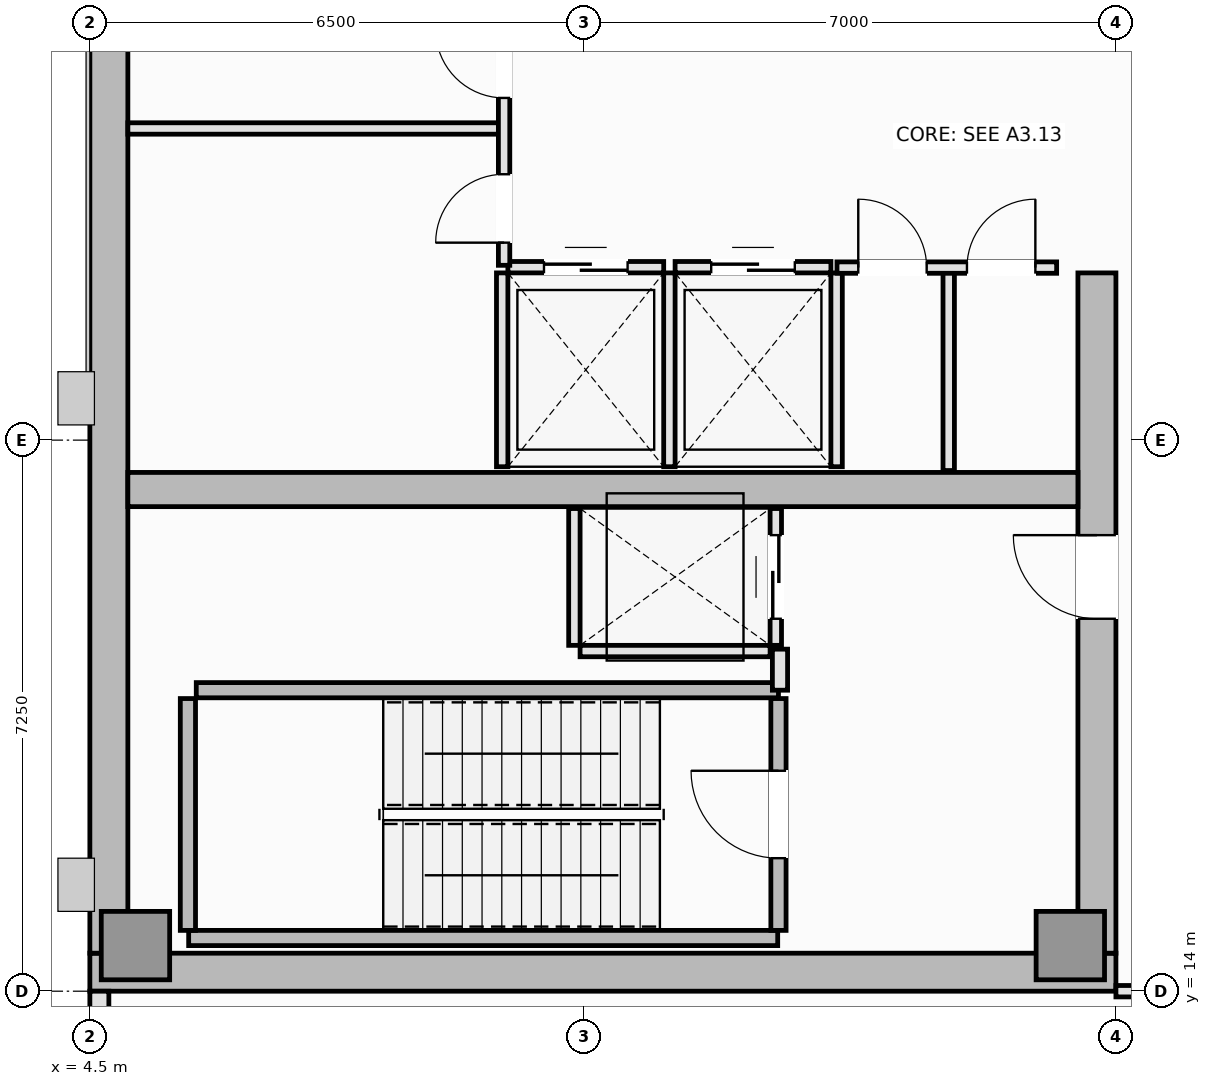
"""IFC4 building model, lengths in metres.
Left out: names, types, materials, properties, quantities, classifications, styles, units other than length and angle.
Written with IfcOpenShell. Run it as: python <this file> out.ifc"""

import sys

from ifc_helpers import new_model, si_unit, direction, frame, frame_2d, origin, origin_2d, place, context, subcontext, project, spatial, rectangle, extrude, element, fill, save


model = new_model("IFC4")
c1 = context("Model", 3, precision=1e-05, world=origin(), true_north=direction((0.0, 1.0)))
c2 = subcontext(c1, "Body", "Model", "MODEL_VIEW")
j1 = project(units=[si_unit("LENGTHUNIT", "METRE"), si_unit("PLANEANGLEUNIT", "RADIAN")], contexts=[c1])
p1 = place(None, origin())
s1 = spatial("IfcSite", under=j1, at=p1, CompositionType="ELEMENT")
p2 = place(p1, origin())
s2 = spatial("IfcBuilding", under=s1, at=p2, CompositionType="ELEMENT")
p3 = place(p2, frame((0.0, 0.0, 291.85)))
s3 = spatial("IfcBuildingStorey", under=s2, at=p3, CompositionType="ELEMENT", Elevation=291.85)
p4 = place(p3, frame((4.5, 14.25, 0.0), z_axis=(0.0, 0.0, 1.0), x_axis=(1.0, 0.0, 0.0)))
e1 = element("IfcWall", 1, at=p4, inside=s3, PredefinedType="SHEAR", context=c2, shape_type="SweptSolid", body=[
    extrude(rectangle(XDim=13.5, YDim=0.5, at=frame_2d((6.75, 0.0))), origin(), (0.0, 0.0, 1.0), 4.8),
])
p5 = place(p3, frame((4.75, 14.5, 0.0), z_axis=(0.0, 0.0, 1.0), x_axis=(0.0, 1.0, 0.0)))
e2 = element("IfcWall", 2, at=p5, inside=s3, PredefinedType="SHEAR", context=c2, shape_type="SweptSolid", body=[
    extrude(rectangle(XDim=21.5, YDim=0.5, at=frame_2d((10.75, 0.0))), origin(), (0.0, 0.0, 1.0), 4.8),
])
p6 = place(p3, frame((17.75, 14.5, 0.0), z_axis=(0.0, 0.0, 1.0), x_axis=(0.0, 1.0, 0.0)))
e3 = element("IfcWall", 3, at=p6, inside=s3, PredefinedType="SHEAR", context=c2, shape_type="SweptSolid", body=[
    extrude(rectangle(XDim=8.95, YDim=0.5, at=frame_2d((4.475, 0.0))), origin(), (0.0, 0.0, 1.0), 4.8),
])
p7 = place(p6, frame((4.4, 0.0, 0.0)))
e4 = element("IfcOpeningElement", 4, at=p7, cuts=e3, PredefinedType="OPENING", context=c2, shape_type="SweptSolid", body=[
    extrude(rectangle(XDim=1.1, YDim=2.15, at=frame_2d((0.55, 1.075))), frame((0.0, 0.26, 0.0), z_axis=(0.0, -1.0, 0.0), x_axis=(1.0, 0.0, 0.0)), (0.0, 0.0, 1.0), 0.52),
])
p8 = place(p3, frame((5.0, 20.6, 0.0), z_axis=(0.0, 0.0, 1.0), x_axis=(1.0, 0.0, 0.0)))
e5 = element("IfcWall", 5, at=p8, inside=s3, PredefinedType="SHEAR", context=c2, shape_type="SweptSolid", body=[
    extrude(rectangle(XDim=12.5, YDim=0.45, at=frame_2d((6.25, 0.0))), origin(), (0.0, 0.0, 1.0), 4.8),
])
for number, where, z_axis, x_axis in (
    (6, (5.1, 14.6, 0.0), (0.0, 0.0, 1.0), (1.0, 0.0, 0.0)),
    (7, (17.4, 14.6, 0.0), (0.0, 0.0, 1.0), (1.0, 0.0, 0.0)),
):
    element("IfcColumn", number, at=place(p3, frame(where, z_axis=z_axis, x_axis=x_axis)), inside=s3, PredefinedType="PILASTER", context=c2, shape_type="SweptSolid", body=[
        extrude(rectangle(XDim=0.9, YDim=0.9, at=origin_2d()), origin(), (0.0, 0.0, 1.0), 4.8),
    ])
p9 = place(p3, frame((4.625, 14.0, 0.0), z_axis=(0.0, 0.0, 1.0), x_axis=(0.0, -1.0, 0.0)))
e8 = element("IfcWall", 8, at=p9, inside=s3, PredefinedType="SOLIDWALL", context=c2, shape_type="SweptSolid", body=[
    extrude(rectangle(XDim=3.4, YDim=0.25, at=frame_2d((1.7, 0.0))), origin(), (0.0, 0.0, 1.0), 4.6),
])
p10 = place(p9, frame((0.6, 0.0, 0.9)))
e9 = element("IfcOpeningElement", 9, at=p10, cuts=e8, PredefinedType="OPENING", context=c2, shape_type="SweptSolid", body=[
    extrude(rectangle(XDim=2.2, YDim=1.8, at=frame_2d((1.1, 0.9))), frame((0.0, 0.135, 0.0), z_axis=(0.0, -1.0, 0.0), x_axis=(1.0, 0.0, 0.0)), (0.0, 0.0, 1.0), 0.27),
])
p11 = place(p3, frame((5.8, 14.7, 0.0), z_axis=(0.0, 0.0, 1.0), x_axis=(1.0, 0.0, 0.0)))
e10 = element("IfcWall", 10, at=p11, inside=s3, PredefinedType="SOLIDWALL", context=c2, shape_type="SweptSolid", body=[
    extrude(rectangle(XDim=7.75, YDim=0.2, at=frame_2d((3.875, 0.0))), origin(), (0.0, 0.0, 1.0), 4.8),
])
p12 = place(p3, frame((5.79, 14.8, 0.0), z_axis=(0.0, 0.0, 1.0), x_axis=(0.0, 1.0, 0.0)))
e11 = element("IfcWall", 11, at=p12, inside=s3, PredefinedType="SOLIDWALL", context=c2, shape_type="SweptSolid", body=[
    extrude(rectangle(XDim=3.05, YDim=0.2, at=frame_2d((1.525, 0.0))), origin(), (0.0, 0.0, 1.0), 4.8),
])
p13 = place(p3, frame((5.9, 17.96, 0.0), z_axis=(0.0, 0.0, 1.0), x_axis=(1.0, 0.0, 0.0)))
e12 = element("IfcWall", 12, at=p13, inside=s3, PredefinedType="SOLIDWALL", context=c2, shape_type="SweptSolid", body=[
    extrude(rectangle(XDim=7.66, YDim=0.2, at=frame_2d((3.83, 0.0))), origin(), (0.0, 0.0, 1.0), 4.8),
])
p14 = place(p3, frame((13.56, 14.8, 0.0), z_axis=(0.0, 0.0, 1.0), x_axis=(0.0, 1.0, 0.0)))
e13 = element("IfcWall", 13, at=p14, inside=s3, PredefinedType="SOLIDWALL", context=c2, shape_type="SweptSolid", body=[
    extrude(rectangle(XDim=3.05, YDim=0.2, at=frame_2d((1.525, 0.0))), origin(), (0.0, 0.0, 1.0), 4.8),
])
p15 = place(p14, frame((0.95, 0.0, 0.0)))
e14 = element("IfcOpeningElement", 14, at=p15, cuts=e13, PredefinedType="OPENING", context=c2, shape_type="SweptSolid", body=[
    extrude(rectangle(XDim=1.15, YDim=2.15, at=frame_2d((0.575, 1.075))), frame((0.0, 0.11, 0.0), z_axis=(0.0, -1.0, 0.0), x_axis=(1.0, 0.0, 0.0)), (0.0, 0.0, 1.0), 0.22),
])
p16 = place(p3, frame((10.0, 23.525, 0.0), z_axis=(0.0, 0.0, 1.0), x_axis=(1.0, 0.0, 0.0)))
e15 = element("IfcWall", 15, at=p16, inside=s3, PredefinedType="PARTITIONING", context=c2, shape_type="SweptSolid", body=[
    extrude(rectangle(XDim=2.05, YDim=0.15, at=frame_2d((1.025, 0.0))), origin(), (0.0, 0.0, 1.0), 4.6),
])
p17 = place(p16, frame((0.475, 0.0, 0.0)))
e16 = element("IfcOpeningElement", 16, at=p17, cuts=e15, PredefinedType="OPENING", context=c2, shape_type="SweptSolid", body=[
    extrude(rectangle(XDim=1.1, YDim=2.2, at=frame_2d((0.55, 1.1))), frame((0.0, 0.085, 0.0), z_axis=(0.0, -1.0, 0.0), x_axis=(1.0, 0.0, 0.0)), (0.0, 0.0, 1.0), 0.17),
])
for number, where, z_axis, x_axis in (
    (17, (9.925, 20.9, 0.0), (0.0, 0.0, 1.0), (0.0, 1.0, 0.0)),
    (18, (12.125, 20.9, 0.0), (0.0, 0.0, 1.0), (0.0, 1.0, 0.0)),
):
    element("IfcWall", number, at=place(p3, frame(where, z_axis=z_axis, x_axis=x_axis)), inside=s3, PredefinedType="PARTITIONING", context=c2, shape_type="SweptSolid", body=[
        extrude(rectangle(XDim=2.55, YDim=0.15, at=frame_2d((1.275, 0.0))), origin(), (0.0, 0.0, 1.0), 4.6),
    ])
p18 = place(p3, frame((12.2, 23.525, 0.0), z_axis=(0.0, 0.0, 1.0), x_axis=(1.0, 0.0, 0.0)))
e19 = element("IfcWall", 19, at=p18, inside=s3, PredefinedType="PARTITIONING", context=c2, shape_type="SweptSolid", body=[
    extrude(rectangle(XDim=2.05, YDim=0.15, at=frame_2d((1.025, 0.0))), origin(), (0.0, 0.0, 1.0), 4.6),
])
p19 = place(p18, frame((0.475, 0.0, 0.0)))
e20 = element("IfcOpeningElement", 20, at=p19, cuts=e19, PredefinedType="OPENING", context=c2, shape_type="SweptSolid", body=[
    extrude(rectangle(XDim=1.1, YDim=2.2, at=frame_2d((0.55, 1.1))), frame((0.0, 0.085, 0.0), z_axis=(0.0, -1.0, 0.0), x_axis=(1.0, 0.0, 0.0)), (0.0, 0.0, 1.0), 0.17),
])
p20 = place(p3, frame((14.325, 20.9, 0.0), z_axis=(0.0, 0.0, 1.0), x_axis=(0.0, 1.0, 0.0)))
e21 = element("IfcWall", 21, at=p20, inside=s3, PredefinedType="PARTITIONING", context=c2, shape_type="SweptSolid", body=[
    extrude(rectangle(XDim=2.55, YDim=0.15, at=frame_2d((1.275, 0.0))), origin(), (0.0, 0.0, 1.0), 4.6),
])
p21 = place(p3, frame((10.95, 18.475, 0.0), z_axis=(0.0, 0.0, 1.0), x_axis=(1.0, 0.0, 0.0)))
e22 = element("IfcWall", 22, at=p21, inside=s3, PredefinedType="PARTITIONING", context=c2, shape_type="SweptSolid", body=[
    extrude(rectangle(XDim=2.5, YDim=0.15, at=frame_2d((1.25, 0.0))), origin(), (0.0, 0.0, 1.0), 4.6),
])
p22 = place(p3, frame((10.875, 18.55, 0.0), z_axis=(0.0, 0.0, 1.0), x_axis=(0.0, 1.0, 0.0)))
e23 = element("IfcWall", 23, at=p22, inside=s3, PredefinedType="PARTITIONING", context=c2, shape_type="SweptSolid", body=[
    extrude(rectangle(XDim=1.8, YDim=0.15, at=frame_2d((0.9, 0.0))), origin(), (0.0, 0.0, 1.0), 4.6),
])
p23 = place(p3, frame((13.525, 18.55, 0.0), z_axis=(0.0, 0.0, 1.0), x_axis=(0.0, 1.0, 0.0)))
e24 = element("IfcWall", 24, at=p23, inside=s3, PredefinedType="PARTITIONING", context=c2, shape_type="SweptSolid", body=[
    extrude(rectangle(XDim=1.8, YDim=0.15, at=frame_2d((0.9, 0.0))), origin(), (0.0, 0.0, 1.0), 4.6),
])
p24 = place(p23, frame((0.35, 0.0, 0.0)))
e25 = element("IfcOpeningElement", 25, at=p24, cuts=e24, PredefinedType="OPENING", context=c2, shape_type="SweptSolid", body=[
    extrude(rectangle(XDim=1.1, YDim=2.2, at=frame_2d((0.55, 1.1))), frame((0.0, 0.085, 0.0), z_axis=(0.0, -1.0, 0.0), x_axis=(1.0, 0.0, 0.0)), (0.0, 0.0, 1.0), 0.17),
])
p25 = place(p3, frame((13.58, 17.96, 0.0), z_axis=(0.0, 0.0, 1.0), x_axis=(0.0, 1.0, 0.0)))
e26 = element("IfcWall", 26, at=p25, inside=s3, PredefinedType="PARTITIONING", context=c2, shape_type="SweptSolid", body=[
    extrude(rectangle(XDim=0.54, YDim=0.2, at=frame_2d((0.27, 0.0))), origin(), (0.0, 0.0, 1.0), 4.6),
])
p26 = place(p3, frame((5.0, 25.35, 0.0), z_axis=(0.0, 0.0, 1.0), x_axis=(1.0, 0.0, 0.0)))
e27 = element("IfcWall", 27, at=p26, inside=s3, PredefinedType="PARTITIONING", context=c2, shape_type="SweptSolid", body=[
    extrude(rectangle(XDim=4.95, YDim=0.15, at=frame_2d((2.475, 0.0))), origin(), (0.0, 0.0, 1.0), 4.6),
])
p27 = place(p3, frame((9.95, 23.55, 0.0), z_axis=(0.0, 0.0, 1.0), x_axis=(0.0, 1.0, 0.0)))
e28 = element("IfcWall", 28, at=p27, inside=s3, PredefinedType="PARTITIONING", context=c2, shape_type="SweptSolid", body=[
    extrude(rectangle(XDim=3.4, YDim=0.15, at=frame_2d((1.7, 0.0))), origin(), (0.0, 0.0, 1.0), 4.6),
])
p28 = place(p27, frame((0.298, 0.0, 0.0)))
e29 = element("IfcOpeningElement", 29, at=p28, cuts=e28, PredefinedType="OPENING", context=c2, shape_type="SweptSolid", body=[
    extrude(rectangle(XDim=0.9, YDim=2.1, at=frame_2d((0.45, 1.05))), frame((0.0, 0.085, 0.0), z_axis=(0.0, -1.0, 0.0), x_axis=(1.0, 0.0, 0.0)), (0.0, 0.0, 1.0), 0.17),
])
p29 = place(p27, frame((2.202, 0.0, 0.0)))
e30 = element("IfcOpeningElement", 30, at=p29, cuts=e28, PredefinedType="OPENING", context=c2, shape_type="SweptSolid", body=[
    extrude(rectangle(XDim=0.9, YDim=2.1, at=frame_2d((0.45, 1.05))), frame((0.0, 0.085, 0.0), z_axis=(0.0, -1.0, 0.0), x_axis=(1.0, 0.0, 0.0)), (0.0, 0.0, 1.0), 0.17),
])
p30 = place(p3, frame((15.8, 20.85, 0.0), z_axis=(0.0, 0.0, 1.0), x_axis=(0.0, 1.0, 0.0)))
e31 = element("IfcWall", 31, at=p30, inside=s3, PredefinedType="PARTITIONING", context=c2, shape_type="SweptSolid", body=[
    extrude(rectangle(XDim=2.67, YDim=0.15, at=frame_2d((1.335, 0.0))), origin(), (0.0, 0.0, 1.0), 4.6),
])
p31 = place(p3, frame((14.33, 23.52, 0.0), z_axis=(0.0, 0.0, 1.0), x_axis=(1.0, 0.0, 0.0)))
e32 = element("IfcWall", 32, at=p31, inside=s3, PredefinedType="PARTITIONING", context=c2, shape_type="SweptSolid", body=[
    extrude(rectangle(XDim=2.89, YDim=0.15, at=frame_2d((1.445, 0.0))), origin(), (0.0, 0.0, 1.0), 4.6),
])
p32 = place(p31, frame((0.28, 0.0, 0.0)))
e33 = element("IfcOpeningElement", 33, at=p32, cuts=e32, PredefinedType="OPENING", context=c2, shape_type="SweptSolid", body=[
    extrude(rectangle(XDim=0.9, YDim=2.1, at=frame_2d((0.45, 1.05))), frame((0.0, 0.085, 0.0), z_axis=(0.0, -1.0, 0.0), x_axis=(1.0, 0.0, 0.0)), (0.0, 0.0, 1.0), 0.17),
])
p33 = place(p31, frame((1.71, 0.0, 0.0)))
e34 = element("IfcOpeningElement", 34, at=p33, cuts=e32, PredefinedType="OPENING", context=c2, shape_type="SweptSolid", body=[
    extrude(rectangle(XDim=0.9, YDim=2.1, at=frame_2d((0.45, 1.05))), frame((0.0, 0.085, 0.0), z_axis=(0.0, -1.0, 0.0), x_axis=(1.0, 0.0, 0.0)), (0.0, 0.0, 1.0), 0.17),
])
p34 = place(p3, frame((18.0, 14.0, 0.0), z_axis=(0.0, 0.0, 1.0), x_axis=(1.0, 0.0, 0.0)))
e35 = element("IfcWall", 35, at=p34, inside=s3, PredefinedType="PARTITIONING", context=c2, shape_type="SweptSolid", body=[
    extrude(rectangle(XDim=2.2, YDim=0.15, at=frame_2d((1.1, 0.0))), origin(), (0.0, 0.0, 1.0), 4.6),
])
p35 = place(p34, frame((0.65, 0.0, 0.0)))
e36 = element("IfcOpeningElement", 36, at=p35, cuts=e35, PredefinedType="OPENING", context=c2, shape_type="SweptSolid", body=[
    extrude(rectangle(XDim=0.9, YDim=2.1, at=frame_2d((0.45, 1.05))), frame((0.0, 0.085, 0.0), z_axis=(0.0, -1.0, 0.0), x_axis=(1.0, 0.0, 0.0)), (0.0, 0.0, 1.0), 0.17),
])
p36 = place(p15, origin())
e37 = element("IfcDoor", 37, at=p36, inside=s3, OperationType="SINGLE_SWING_RIGHT", PredefinedType="DOOR", context=c2, shape_type="SweptSolid", body=[
    extrude(rectangle(XDim=1.15, YDim=2.15, at=frame_2d((0.575, 1.075))), frame((0.0, 0.025, 0.0), z_axis=(0.0, -1.0, 0.0), x_axis=(1.0, 0.0, 0.0)), (0.0, 0.0, 1.0), 0.05),
])
fill(e14, e37)
p37 = place(p17, origin())
e38 = element("IfcDoor", 38, at=p37, inside=s3, OperationType="DOUBLE_DOOR_SLIDING", PredefinedType="DOOR", context=c2, shape_type="SweptSolid", body=[
    extrude(rectangle(XDim=1.1, YDim=2.2, at=frame_2d((0.55, 1.1))), frame((0.0, 0.025, 0.0), z_axis=(0.0, -1.0, 0.0), x_axis=(1.0, 0.0, 0.0)), (0.0, 0.0, 1.0), 0.05),
])
fill(e16, e38)
p38 = place(p19, origin())
e39 = element("IfcDoor", 39, at=p38, inside=s3, OperationType="DOUBLE_DOOR_SLIDING", PredefinedType="DOOR", context=c2, shape_type="SweptSolid", body=[
    extrude(rectangle(XDim=1.1, YDim=2.2, at=frame_2d((0.55, 1.1))), frame((0.0, 0.025, 0.0), z_axis=(0.0, -1.0, 0.0), x_axis=(1.0, 0.0, 0.0)), (0.0, 0.0, 1.0), 0.05),
])
fill(e20, e39)
p39 = place(p24, origin())
e40 = element("IfcDoor", 40, at=p39, inside=s3, OperationType="DOUBLE_DOOR_SLIDING", PredefinedType="DOOR", context=c2, shape_type="SweptSolid", body=[
    extrude(rectangle(XDim=1.1, YDim=2.2, at=frame_2d((0.55, 1.1))), frame((0.0, 0.025, 0.0), z_axis=(0.0, -1.0, 0.0), x_axis=(1.0, 0.0, 0.0)), (0.0, 0.0, 1.0), 0.05),
])
fill(e25, e40)
p40 = place(p7, origin())
e41 = element("IfcDoor", 41, at=p40, inside=s3, OperationType="SINGLE_SWING_RIGHT", PredefinedType="DOOR", context=c2, shape_type="SweptSolid", body=[
    extrude(rectangle(XDim=1.1, YDim=2.15, at=frame_2d((0.55, 1.075))), frame((0.0, 0.025, 0.0), z_axis=(0.0, -1.0, 0.0), x_axis=(1.0, 0.0, 0.0)), (0.0, 0.0, 1.0), 0.05),
])
fill(e4, e41)
p41 = place(p28, origin())
e42 = element("IfcDoor", 42, at=p41, inside=s3, OperationType="SINGLE_SWING_LEFT", PredefinedType="DOOR", context=c2, shape_type="SweptSolid", body=[
    extrude(rectangle(XDim=0.9, YDim=2.1, at=frame_2d((0.45, 1.05))), frame((0.0, 0.025, 0.0), z_axis=(0.0, -1.0, 0.0), x_axis=(1.0, 0.0, 0.0)), (0.0, 0.0, 1.0), 0.05),
])
fill(e29, e42)
p42 = place(p29, origin())
e43 = element("IfcDoor", 43, at=p42, inside=s3, OperationType="SINGLE_SWING_RIGHT", PredefinedType="DOOR", context=c2, shape_type="SweptSolid", body=[
    extrude(rectangle(XDim=0.9, YDim=2.1, at=frame_2d((0.45, 1.05))), frame((0.0, 0.025, 0.0), z_axis=(0.0, -1.0, 0.0), x_axis=(1.0, 0.0, 0.0)), (0.0, 0.0, 1.0), 0.05),
])
fill(e30, e43)
p43 = place(p32, origin())
e44 = element("IfcDoor", 44, at=p43, inside=s3, OperationType="SINGLE_SWING_LEFT", PredefinedType="DOOR", context=c2, shape_type="SweptSolid", body=[
    extrude(rectangle(XDim=0.9, YDim=2.1, at=frame_2d((0.45, 1.05))), frame((0.0, 0.025, 0.0), z_axis=(0.0, -1.0, 0.0), x_axis=(1.0, 0.0, 0.0)), (0.0, 0.0, 1.0), 0.05),
])
fill(e33, e44)
p44 = place(p33, origin())
e45 = element("IfcDoor", 45, at=p44, inside=s3, OperationType="SINGLE_SWING_RIGHT", PredefinedType="DOOR", context=c2, shape_type="SweptSolid", body=[
    extrude(rectangle(XDim=0.9, YDim=2.1, at=frame_2d((0.45, 1.05))), frame((0.0, 0.025, 0.0), z_axis=(0.0, -1.0, 0.0), x_axis=(1.0, 0.0, 0.0)), (0.0, 0.0, 1.0), 0.05),
])
fill(e34, e45)
save(model, sys.argv[1])
